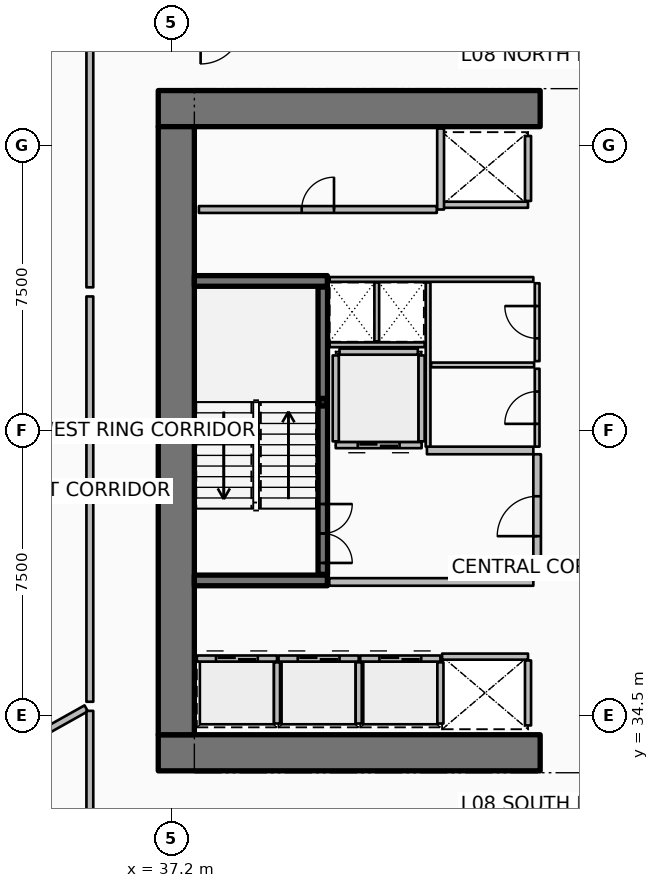
"""IFC4 building model, lengths in metres.
Left out: names, types, materials, properties, quantities, classifications, styles, units other than length and angle.
Written with IfcOpenShell. Run it as: python <this file> out.ifc"""

import sys

from ifc_helpers import new_model, si_unit, direction, frame, frame_2d, origin, origin_2d, place, context, subcontext, project, spatial, rectangle, hollow_rectangle, extrude, element, fill, save


model = new_model("IFC4")
c1 = context("Model", 3, precision=1e-05, world=origin(), true_north=direction((0.0, 1.0)))
c2 = subcontext(c1, "Body", "Model", "MODEL_VIEW")
j1 = project(units=[si_unit("LENGTHUNIT", "METRE"), si_unit("PLANEANGLEUNIT", "RADIAN")], contexts=[c1])
p1 = place(None, origin())
s1 = spatial("IfcSite", under=j1, at=p1, CompositionType="ELEMENT")
p2 = place(p1, origin())
s2 = spatial("IfcBuilding", under=s1, at=p2, CompositionType="ELEMENT")
p3 = place(p2, frame((0.0, 0.0, 37.65)))
s3 = spatial("IfcBuildingStorey", under=s2, at=p3, CompositionType="ELEMENT", Elevation=37.65)
for number, where, z_axis, x_axis in (
    (1, (36.85, 33.525, 0.0), (0.0, 0.0, 1.0), (1.0, 0.0, 0.0)),
    (2, (36.85, 50.475, 0.0), (0.0, 0.0, 1.0), (1.0, 0.0, 0.0)),
):
    element("IfcWall", number, at=place(p3, frame(where, z_axis=z_axis, x_axis=x_axis)), inside=s3, PredefinedType="SHEAR", context=c2, shape_type="SweptSolid", body=[
        extrude(rectangle(XDim=10.05, YDim=0.95, at=frame_2d((5.025, 0.0))), origin(), (0.0, 0.0, 1.0), 3.75),
    ])
p4 = place(p3, frame((37.325, 34.0, 0.0), z_axis=(0.0, 0.0, 1.0), x_axis=(0.0, 1.0, 0.0)))
e3 = element("IfcWall", 3, at=p4, inside=s3, PredefinedType="SHEAR", context=c2, shape_type="SweptSolid", body=[
    extrude(rectangle(XDim=16.0, YDim=0.95, at=frame_2d((8.0, 0.0))), origin(), (0.0, 0.0, 1.0), 3.75),
])
for number, where, z_axis, x_axis in (
    (4, (37.8, 38.06, 0.0), (0.0, 0.0, 1.0), (1.0, 0.0, 0.0)),
    (5, (37.8, 45.94, 0.0), (0.0, 0.0, 1.0), (1.0, 0.0, 0.0)),
):
    element("IfcWall", number, at=place(p3, frame(where, z_axis=z_axis, x_axis=x_axis)), inside=s3, PredefinedType="SHEAR", context=c2, shape_type="SweptSolid", body=[
        extrude(rectangle(XDim=3.5, YDim=0.28, at=frame_2d((1.75, 0.0))), origin(), (0.0, 0.0, 1.0), 3.75),
    ])
p5 = place(p3, frame((41.18, 42.75, 0.0), z_axis=(0.0, 0.0, 1.0), x_axis=(1.0, 0.0, 0.0)))
e6 = element("IfcColumn", 6, at=p5, inside=s3, PredefinedType="COLUMN", context=c2, shape_type="SweptSolid", body=[
    extrude(hollow_rectangle(XDim=0.2, YDim=0.2, WallThickness=0.01, InnerFilletRadius=0.01, OuterFilletRadius=0.02, at=origin_2d()), origin(), (0.0, 0.0, 1.0), 1.67),
])
p6 = place(p3, frame((41.18, 38.22, 0.0), z_axis=(0.0, 0.0, 1.0), x_axis=(0.0, 1.0, 0.0)))
e7 = element("IfcWall", 7, at=p6, inside=s3, PredefinedType="SOLIDWALL", context=c2, shape_type="SweptSolid", body=[
    extrude(rectangle(XDim=7.56, YDim=0.25, at=frame_2d((3.78, 0.0))), origin(), (0.0, 0.0, 1.0), 3.5),
])
p7 = place(p6, frame((0.3, 0.0, 0.0)))
e8 = element("IfcOpeningElement", 8, at=p7, cuts=e7, PredefinedType="OPENING", context=c2, shape_type="SweptSolid", body=[
    extrude(rectangle(XDim=1.55, YDim=2.15, at=frame_2d((0.775, 1.075))), frame((0.0, 0.135, 0.0), z_axis=(0.0, -1.0, 0.0), x_axis=(1.0, 0.0, 0.0)), (0.0, 0.0, 1.0), 0.27),
])
p8 = place(p3, frame((37.865, 36.005, 0.0), z_axis=(0.0, 0.0, 1.0), x_axis=(1.0, 0.0, 0.0)))
e9 = element("IfcWall", 9, at=p8, inside=s3, PredefinedType="PARTITIONING", context=c2, shape_type="SweptSolid", body=[
    extrude(rectangle(XDim=2.11, YDim=0.16, at=frame_2d((1.055, 0.0))), origin(), (0.0, 0.0, 1.0), 3.5),
])
p9 = place(p8, frame((0.505, 0.0, 0.0)))
e10 = element("IfcOpeningElement", 10, at=p9, cuts=e9, PredefinedType="OPENING", context=c2, shape_type="SweptSolid", body=[
    extrude(rectangle(XDim=1.1, YDim=2.1, at=frame_2d((0.55, 1.05))), frame((0.0, 0.09, 0.0), z_axis=(0.0, -1.0, 0.0), x_axis=(1.0, 0.0, 0.0)), (0.0, 0.0, 1.0), 0.18),
])
p10 = place(p3, frame((39.975, 34.295, 0.0), z_axis=(0.0, 0.0, 1.0), x_axis=(0.0, 1.0, 0.0)))
e11 = element("IfcWall", 11, at=p10, inside=s3, PredefinedType="PARTITIONING", context=c2, shape_type="SweptSolid", body=[
    extrude(rectangle(XDim=1.61, YDim=0.16, at=frame_2d((0.805, 0.0))), origin(), (0.0, 0.0, 1.0), 3.5),
])
p11 = place(p3, frame((40.015, 36.005, 0.0), z_axis=(0.0, 0.0, 1.0), x_axis=(1.0, 0.0, 0.0)))
e12 = element("IfcWall", 12, at=p11, inside=s3, PredefinedType="PARTITIONING", context=c2, shape_type="SweptSolid", body=[
    extrude(rectangle(XDim=2.11, YDim=0.16, at=frame_2d((1.055, 0.0))), origin(), (0.0, 0.0, 1.0), 3.5),
])
p12 = place(p11, frame((0.505, 0.0, 0.0)))
e13 = element("IfcOpeningElement", 13, at=p12, cuts=e12, PredefinedType="OPENING", context=c2, shape_type="SweptSolid", body=[
    extrude(rectangle(XDim=1.1, YDim=2.1, at=frame_2d((0.55, 1.05))), frame((0.0, 0.09, 0.0), z_axis=(0.0, -1.0, 0.0), x_axis=(1.0, 0.0, 0.0)), (0.0, 0.0, 1.0), 0.18),
])
p13 = place(p3, frame((42.125, 34.295, 0.0), z_axis=(0.0, 0.0, 1.0), x_axis=(0.0, 1.0, 0.0)))
e14 = element("IfcWall", 14, at=p13, inside=s3, PredefinedType="PARTITIONING", context=c2, shape_type="SweptSolid", body=[
    extrude(rectangle(XDim=1.61, YDim=0.16, at=frame_2d((0.805, 0.0))), origin(), (0.0, 0.0, 1.0), 3.5),
])
p14 = place(p3, frame((42.165, 36.005, 0.0), z_axis=(0.0, 0.0, 1.0), x_axis=(1.0, 0.0, 0.0)))
e15 = element("IfcWall", 15, at=p14, inside=s3, PredefinedType="PARTITIONING", context=c2, shape_type="SweptSolid", body=[
    extrude(rectangle(XDim=2.11, YDim=0.16, at=frame_2d((1.055, 0.0))), origin(), (0.0, 0.0, 1.0), 3.5),
])
p15 = place(p14, frame((0.505, 0.0, 0.0)))
e16 = element("IfcOpeningElement", 16, at=p15, cuts=e15, PredefinedType="OPENING", context=c2, shape_type="SweptSolid", body=[
    extrude(rectangle(XDim=1.1, YDim=2.1, at=frame_2d((0.55, 1.05))), frame((0.0, 0.09, 0.0), z_axis=(0.0, -1.0, 0.0), x_axis=(1.0, 0.0, 0.0)), (0.0, 0.0, 1.0), 0.18),
])
p16 = place(p3, frame((44.275, 34.295, 0.0), z_axis=(0.0, 0.0, 1.0), x_axis=(0.0, 1.0, 0.0)))
e17 = element("IfcWall", 17, at=p16, inside=s3, PredefinedType="PARTITIONING", context=c2, shape_type="SweptSolid", body=[
    extrude(rectangle(XDim=1.61, YDim=0.16, at=frame_2d((0.805, 0.0))), origin(), (0.0, 0.0, 1.0), 3.5),
])
p17 = place(p3, frame((46.58, 47.945, 0.0), z_axis=(0.0, 0.0, 1.0), x_axis=(-1.0, 0.0, 0.0)))
e18 = element("IfcWall", 18, at=p17, inside=s3, PredefinedType="PARTITIONING", context=c2, shape_type="SweptSolid", body=[
    extrude(rectangle(XDim=2.26, YDim=0.16, at=frame_2d((1.13, 0.0))), origin(), (0.0, 0.0, 1.0), 3.5),
])
p18 = place(p3, frame((46.58, 48.045, 0.0), z_axis=(0.0, 0.0, 1.0), x_axis=(0.0, 1.0, 0.0)))
e19 = element("IfcWall", 19, at=p18, inside=s3, PredefinedType="PARTITIONING", context=c2, shape_type="SweptSolid", body=[
    extrude(rectangle(XDim=1.71, YDim=0.16, at=frame_2d((0.855, 0.0))), origin(), (0.0, 0.0, 1.0), 3.5),
])
p19 = place(p3, frame((44.32, 36.055, 0.0), z_axis=(0.0, 0.0, 1.0), x_axis=(1.0, 0.0, 0.0)))
e20 = element("IfcWall", 20, at=p19, inside=s3, PredefinedType="PARTITIONING", context=c2, shape_type="SweptSolid", body=[
    extrude(rectangle(XDim=2.26, YDim=0.16, at=frame_2d((1.13, 0.0))), origin(), (0.0, 0.0, 1.0), 3.5),
])
p20 = place(p3, frame((46.58, 34.245, 0.0), z_axis=(0.0, 0.0, 1.0), x_axis=(0.0, 1.0, 0.0)))
e21 = element("IfcWall", 21, at=p20, inside=s3, PredefinedType="PARTITIONING", context=c2, shape_type="SweptSolid", body=[
    extrude(rectangle(XDim=1.71, YDim=0.16, at=frame_2d((0.855, 0.0))), origin(), (0.0, 0.0, 1.0), 3.5),
])
p21 = place(p3, frame((43.78, 41.62, 0.0), z_axis=(0.0, 0.0, 1.0), x_axis=(-1.0, 0.0, 0.0)))
e22 = element("IfcWall", 22, at=p21, inside=s3, PredefinedType="PARTITIONING", context=c2, shape_type="SweptSolid", body=[
    extrude(rectangle(XDim=2.26, YDim=0.16, at=frame_2d((1.13, 0.0))), origin(), (0.0, 0.0, 1.0), 3.5),
])
p22 = place(p21, frame((0.58, 0.0, 0.0)))
e23 = element("IfcOpeningElement", 23, at=p22, cuts=e22, PredefinedType="OPENING", context=c2, shape_type="SweptSolid", body=[
    extrude(rectangle(XDim=1.1, YDim=2.1, at=frame_2d((0.55, 1.05))), frame((0.0, 0.09, 0.0), z_axis=(0.0, -1.0, 0.0), x_axis=(1.0, 0.0, 0.0)), (0.0, 0.0, 1.0), 0.18),
])
for number, where, z_axis, x_axis in (
    (24, (43.78, 41.72, 0.0), (0.0, 0.0, 1.0), (0.0, 1.0, 0.0)),
    (25, (41.52, 41.72, 0.0), (0.0, 0.0, 1.0), (0.0, 1.0, 0.0)),
):
    element("IfcWall", number, at=place(p3, frame(where, z_axis=z_axis, x_axis=x_axis)), inside=s3, PredefinedType="PARTITIONING", context=c2, shape_type="SweptSolid", body=[
        extrude(rectangle(XDim=2.26, YDim=0.16, at=frame_2d((1.13, 0.0))), origin(), (0.0, 0.0, 1.0), 3.5),
    ])
p23 = place(p3, frame((41.62, 44.08, 0.0), z_axis=(0.0, 0.0, 1.0), x_axis=(1.0, 0.0, 0.0)))
e26 = element("IfcWall", 26, at=p23, inside=s3, PredefinedType="PARTITIONING", context=c2, shape_type="SweptSolid", body=[
    extrude(rectangle(XDim=2.06, YDim=0.16, at=frame_2d((1.03, 0.0))), origin(), (0.0, 0.0, 1.0), 3.5),
])
p24 = place(p3, frame((37.92, 47.82, 0.0), z_axis=(0.0, 0.0, 1.0), x_axis=(1.0, 0.0, 0.0)))
e27 = element("IfcWall", 27, at=p24, inside=s3, PredefinedType="PARTITIONING", context=c2, shape_type="SweptSolid", body=[
    extrude(rectangle(XDim=6.26, YDim=0.18, at=frame_2d((3.13, 0.0))), origin(), (0.0, 0.0, 1.0), 3.5),
])
p25 = place(p24, frame((2.705, 0.0, 0.0)))
e28 = element("IfcOpeningElement", 28, at=p25, cuts=e27, PredefinedType="OPENING", context=c2, shape_type="SweptSolid", body=[
    extrude(rectangle(XDim=0.85, YDim=2.06, at=frame_2d((0.425, 1.03))), frame((0.0, 0.1, 0.0), z_axis=(0.0, -1.0, 0.0), x_axis=(1.0, 0.0, 0.0)), (0.0, 0.0, 1.0), 0.2),
])
p26 = place(p3, frame((44.28, 47.82, 0.0), z_axis=(0.0, 0.0, 1.0), x_axis=(0.0, 1.0, 0.0)))
e29 = element("IfcWall", 29, at=p26, inside=s3, PredefinedType="PARTITIONING", context=c2, shape_type="SweptSolid", body=[
    extrude(rectangle(XDim=2.13, YDim=0.18, at=frame_2d((1.065, 0.0))), origin(), (0.0, 0.0, 1.0), 3.5),
])
p27 = place(p3, frame((41.35, 38.02, 0.0), z_axis=(0.0, 0.0, 1.0), x_axis=(1.0, 0.0, 0.0)))
e30 = element("IfcWall", 30, at=p27, inside=s3, PredefinedType="PARTITIONING", context=c2, shape_type="SweptSolid", body=[
    extrude(rectangle(XDim=5.37, YDim=0.2, at=frame_2d((2.685, 0.0))), origin(), (0.0, 0.0, 1.0), 3.5),
])
p28 = place(p3, frame((43.92, 41.48, 0.0), z_axis=(0.0, 0.0, 1.0), x_axis=(1.0, 0.0, 0.0)))
e31 = element("IfcWall", 31, at=p28, inside=s3, PredefinedType="PARTITIONING", context=c2, shape_type="SweptSolid", body=[
    extrude(rectangle(XDim=2.8, YDim=0.2, at=frame_2d((1.4, 0.0))), origin(), (0.0, 0.0, 1.0), 3.5),
])
p29 = place(p3, frame((46.82, 38.12, 0.0), z_axis=(0.0, 0.0, 1.0), x_axis=(0.0, 1.0, 0.0)))
e32 = element("IfcWall", 32, at=p29, inside=s3, PredefinedType="PARTITIONING", context=c2, shape_type="SweptSolid", body=[
    extrude(rectangle(XDim=3.26, YDim=0.2, at=frame_2d((1.63, 0.0))), origin(), (0.0, 0.0, 1.0), 3.5),
])
p30 = place(p29, frame((1.105, 0.0, 0.0)))
e33 = element("IfcOpeningElement", 33, at=p30, cuts=e32, PredefinedType="OPENING", context=c2, shape_type="SweptSolid", body=[
    extrude(rectangle(XDim=1.05, YDim=2.1, at=frame_2d((0.525, 1.05))), frame((0.0, 0.11, 0.0), z_axis=(0.0, -1.0, 0.0), x_axis=(1.0, 0.0, 0.0)), (0.0, 0.0, 1.0), 0.22),
])
p31 = place(p3, frame((41.36, 45.98, 0.0), z_axis=(0.0, 0.0, 1.0), x_axis=(1.0, 0.0, 0.0)))
e34 = element("IfcWall", 34, at=p31, inside=s3, PredefinedType="PARTITIONING", context=c2, shape_type="SweptSolid", body=[
    extrude(rectangle(XDim=5.36, YDim=0.125, at=frame_2d((2.68, 0.0))), origin(), (0.0, 0.0, 1.0), 2.94),
])
p32 = place(p3, frame((41.36, 44.26, 0.0), z_axis=(0.0, 0.0, 1.0), x_axis=(1.0, 0.0, 0.0)))
e35 = element("IfcWall", 35, at=p32, inside=s3, PredefinedType="PARTITIONING", context=c2, shape_type="SweptSolid", body=[
    extrude(rectangle(XDim=2.5, YDim=0.125, at=frame_2d((1.25, 0.0))), origin(), (0.0, 0.0, 1.0), 2.94),
])
p33 = place(p3, frame((42.6, 44.35, 0.0), z_axis=(0.0, 0.0, 1.0), x_axis=(0.0, 1.0, 0.0)))
e36 = element("IfcWall", 36, at=p33, inside=s3, PredefinedType="PARTITIONING", context=c2, shape_type="SweptSolid", body=[
    extrude(rectangle(XDim=1.55, YDim=0.125, at=frame_2d((0.775, 0.0))), origin(), (0.0, 0.0, 1.0), 2.94),
])
p34 = place(p3, frame((43.95, 41.58, 0.0), z_axis=(0.0, 0.0, 1.0), x_axis=(0.0, 1.0, 0.0)))
e37 = element("IfcWall", 37, at=p34, inside=s3, PredefinedType="PARTITIONING", context=c2, shape_type="SweptSolid", body=[
    extrude(rectangle(XDim=4.32, YDim=0.125, at=frame_2d((2.16, 0.0))), origin(), (0.0, 0.0, 1.0), 2.94),
])
p35 = place(p3, frame((44.03, 43.73, 0.0), z_axis=(0.0, 0.0, 1.0), x_axis=(1.0, 0.0, 0.0)))
e38 = element("IfcWall", 38, at=p35, inside=s3, PredefinedType="PARTITIONING", context=c2, shape_type="SweptSolid", body=[
    extrude(rectangle(XDim=2.71, YDim=0.125, at=frame_2d((1.355, 0.0))), origin(), (0.0, 0.0, 1.0), 2.94),
])
p36 = place(p3, frame((46.82, 41.58, 0.0), z_axis=(0.0, 0.0, 1.0), x_axis=(0.0, 1.0, 0.0)))
e39 = element("IfcWall", 39, at=p36, inside=s3, PredefinedType="PARTITIONING", context=c2, shape_type="SweptSolid", body=[
    extrude(rectangle(XDim=2.05, YDim=0.125, at=frame_2d((1.025, 0.0))), origin(), (0.0, 0.0, 1.0), 2.94),
])
p37 = place(p36, frame((0.6, 0.0, 0.0)))
e40 = element("IfcOpeningElement", 40, at=p37, cuts=e39, PredefinedType="OPENING", context=c2, shape_type="SweptSolid", body=[
    extrude(rectangle(XDim=0.85, YDim=2.06, at=frame_2d((0.425, 1.03))), frame((0.0, 0.073, 0.0), z_axis=(0.0, -1.0, 0.0), x_axis=(1.0, 0.0, 0.0)), (0.0, 0.0, 1.0), 0.145),
])
p38 = place(p3, frame((46.82, 43.83, 0.0), z_axis=(0.0, 0.0, 1.0), x_axis=(0.0, 1.0, 0.0)))
e41 = element("IfcWall", 41, at=p38, inside=s3, PredefinedType="PARTITIONING", context=c2, shape_type="SweptSolid", body=[
    extrude(rectangle(XDim=2.05, YDim=0.125, at=frame_2d((1.025, 0.0))), origin(), (0.0, 0.0, 1.0), 2.94),
])
p39 = place(p38, frame((0.6, 0.0, 0.0)))
e42 = element("IfcOpeningElement", 42, at=p39, cuts=e41, PredefinedType="OPENING", context=c2, shape_type="SweptSolid", body=[
    extrude(rectangle(XDim=0.85, YDim=2.06, at=frame_2d((0.425, 1.03))), frame((0.0, 0.073, 0.0), z_axis=(0.0, -1.0, 0.0), x_axis=(1.0, 0.0, 0.0)), (0.0, 0.0, 1.0), 0.145),
])
p40 = place(p3, frame((34.954, 34.694, 0.0), z_axis=(0.0, 0.0, 1.0), x_axis=(-0.872493465611, -0.488625779577, 0.0)))
e43 = element("IfcWall", 43, at=p40, inside=s3, PredefinedType="PARTITIONING", context=c2, shape_type="SweptSolid", body=[
    extrude(rectangle(XDim=16.586, YDim=0.18, at=frame_2d((8.293, 0.0))), origin(), (0.0, 0.0, 1.0), 2.867),
])
p41 = place(p3, frame((35.05, 52.089, 0.0), z_axis=(0.0, 0.0, 1.0), x_axis=(0.0, -1.0, 0.0)))
e44 = element("IfcWall", 44, at=p41, inside=s3, PredefinedType="PARTITIONING", context=c2, shape_type="SweptSolid", body=[
    extrude(rectangle(XDim=6.317, YDim=0.18, at=frame_2d((3.158, 0.0))), origin(), (0.0, 0.0, 1.0), 2.867),
])
p42 = place(p3, frame((35.05, 45.532, 0.0), z_axis=(0.0, 0.0, 1.0), x_axis=(0.0, -1.0, 0.0)))
e45 = element("IfcWall", 45, at=p42, inside=s3, PredefinedType="PARTITIONING", context=c2, shape_type="SweptSolid", body=[
    extrude(rectangle(XDim=4.945, YDim=0.18, at=frame_2d((2.472, 0.0))), origin(), (0.0, 0.0, 1.0), 2.867),
])
p43 = place(p3, frame((35.05, 40.347, 0.0), z_axis=(0.0, 0.0, 1.0), x_axis=(0.0, -1.0, 0.0)))
e46 = element("IfcWall", 46, at=p43, inside=s3, PredefinedType="PARTITIONING", context=c2, shape_type="SweptSolid", body=[
    extrude(rectangle(XDim=5.48, YDim=0.18, at=frame_2d((2.74, 0.0))), origin(), (0.0, 0.0, 1.0), 2.867),
])
p44 = place(p3, frame((35.05, 34.628, 0.0), z_axis=(0.0, 0.0, 1.0), x_axis=(0.0, -1.0, 0.0)))
e47 = element("IfcWall", 47, at=p44, inside=s3, PredefinedType="PARTITIONING", context=c2, shape_type="SweptSolid", body=[
    extrude(rectangle(XDim=3.258, YDim=0.18, at=frame_2d((1.629, 0.0))), origin(), (0.0, 0.0, 1.0), 2.867),
])
p45 = place(p7, origin())
e48 = element("IfcDoor", 48, at=p45, inside=s3, OperationType="DOUBLE_DOOR_SINGLE_SWING", PredefinedType="DOOR", context=c2, shape_type="SweptSolid", body=[
    extrude(rectangle(XDim=1.55, YDim=2.15, at=frame_2d((0.775, 1.075))), frame((0.0, 0.025, 0.0), z_axis=(0.0, -1.0, 0.0), x_axis=(1.0, 0.0, 0.0)), (0.0, 0.0, 1.0), 0.05),
])
fill(e8, e48)
p46 = place(p9, origin())
e49 = element("IfcDoor", 49, at=p46, inside=s3, OperationType="DOUBLE_DOOR_SLIDING", PredefinedType="DOOR", context=c2, shape_type="SweptSolid", body=[
    extrude(rectangle(XDim=1.1, YDim=2.1, at=frame_2d((0.55, 1.05))), frame((0.0, 0.025, 0.0), z_axis=(0.0, -1.0, 0.0), x_axis=(1.0, 0.0, 0.0)), (0.0, 0.0, 1.0), 0.05),
])
fill(e10, e49)
p47 = place(p12, origin())
e50 = element("IfcDoor", 50, at=p47, inside=s3, OperationType="DOUBLE_DOOR_SLIDING", PredefinedType="DOOR", context=c2, shape_type="SweptSolid", body=[
    extrude(rectangle(XDim=1.1, YDim=2.1, at=frame_2d((0.55, 1.05))), frame((0.0, 0.025, 0.0), z_axis=(0.0, -1.0, 0.0), x_axis=(1.0, 0.0, 0.0)), (0.0, 0.0, 1.0), 0.05),
])
fill(e13, e50)
p48 = place(p15, origin())
e51 = element("IfcDoor", 51, at=p48, inside=s3, OperationType="DOUBLE_DOOR_SLIDING", PredefinedType="DOOR", context=c2, shape_type="SweptSolid", body=[
    extrude(rectangle(XDim=1.1, YDim=2.1, at=frame_2d((0.55, 1.05))), frame((0.0, 0.025, 0.0), z_axis=(0.0, -1.0, 0.0), x_axis=(1.0, 0.0, 0.0)), (0.0, 0.0, 1.0), 0.05),
])
fill(e16, e51)
p49 = place(p22, origin())
e52 = element("IfcDoor", 52, at=p49, inside=s3, OperationType="DOUBLE_DOOR_SLIDING", PredefinedType="DOOR", context=c2, shape_type="SweptSolid", body=[
    extrude(rectangle(XDim=1.1, YDim=2.1, at=frame_2d((0.55, 1.05))), frame((0.0, 0.025, 0.0), z_axis=(0.0, -1.0, 0.0), x_axis=(1.0, 0.0, 0.0)), (0.0, 0.0, 1.0), 0.05),
])
fill(e23, e52)
p50 = place(p25, origin())
e53 = element("IfcDoor", 53, at=p50, inside=s3, OperationType="SINGLE_SWING_RIGHT", PredefinedType="DOOR", context=c2, shape_type="SweptSolid", body=[
    extrude(rectangle(XDim=0.85, YDim=2.06, at=frame_2d((0.425, 1.03))), frame((0.0, 0.025, 0.0), z_axis=(0.0, -1.0, 0.0), x_axis=(1.0, 0.0, 0.0)), (0.0, 0.0, 1.0), 0.05),
])
fill(e28, e53)
p51 = place(p30, origin())
e54 = element("IfcDoor", 54, at=p51, inside=s3, OperationType="SINGLE_SWING_LEFT", PredefinedType="DOOR", context=c2, shape_type="SweptSolid", body=[
    extrude(rectangle(XDim=1.05, YDim=2.1, at=frame_2d((0.525, 1.05))), frame((0.0, 0.025, 0.0), z_axis=(0.0, -1.0, 0.0), x_axis=(1.0, 0.0, 0.0)), (0.0, 0.0, 1.0), 0.05),
])
fill(e33, e54)
p52 = place(p37, origin())
e55 = element("IfcDoor", 55, at=p52, inside=s3, OperationType="SINGLE_SWING_LEFT", PredefinedType="DOOR", context=c2, shape_type="SweptSolid", body=[
    extrude(rectangle(XDim=0.85, YDim=2.06, at=frame_2d((0.425, 1.03))), frame((0.0, 0.025, 0.0), z_axis=(0.0, -1.0, 0.0), x_axis=(1.0, 0.0, 0.0)), (0.0, 0.0, 1.0), 0.05),
])
fill(e40, e55)
p53 = place(p39, origin())
e56 = element("IfcDoor", 56, at=p53, inside=s3, OperationType="SINGLE_SWING_RIGHT", PredefinedType="DOOR", context=c2, shape_type="SweptSolid", body=[
    extrude(rectangle(XDim=0.85, YDim=2.06, at=frame_2d((0.425, 1.03))), frame((0.0, 0.025, 0.0), z_axis=(0.0, -1.0, 0.0), x_axis=(1.0, 0.0, 0.0)), (0.0, 0.0, 1.0), 0.05),
])
fill(e42, e56)
save(model, sys.argv[1])
